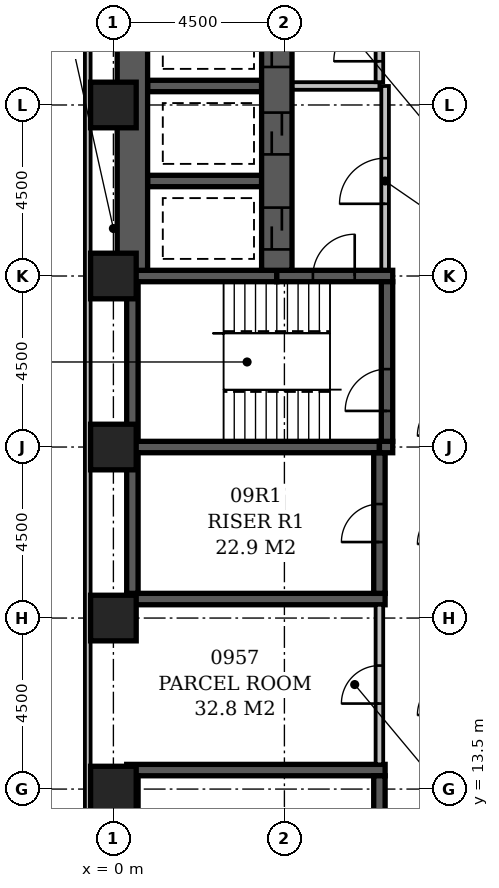
"""IFC4 building model, lengths in metres.
Left out: names, types, materials, properties, quantities, classifications, styles, units other than length and angle.
Written with IfcOpenShell. Run it as: python <this file> out.ifc"""

import sys

from ifc_helpers import new_model, si_unit, direction, frame, frame_2d, origin, origin_2d, place, context, subcontext, project, spatial, rectangle, extrude, element, fill, save


model = new_model("IFC4")
c1 = context("Model", 3, precision=1e-05, world=origin(), true_north=direction((0.0, 1.0)))
c2 = subcontext(c1, "Body", "Model", "MODEL_VIEW")
j1 = project(units=[si_unit("LENGTHUNIT", "METRE"), si_unit("PLANEANGLEUNIT", "RADIAN")], contexts=[c1])
p1 = place(None, origin())
s1 = spatial("IfcSite", under=j1, at=p1, CompositionType="ELEMENT")
p2 = place(p1, origin())
s2 = spatial("IfcBuilding", under=s1, at=p2, CompositionType="ELEMENT")
p3 = place(p2, frame((0.0, 0.0, 43.4)))
s3 = spatial("IfcBuildingStorey", under=s2, at=p3, CompositionType="ELEMENT", Elevation=43.4)
for number, where, z_axis, x_axis in (
    (1, (0.35, 14.0, -0.3), (0.0, 0.0, 1.0), (1.0, 0.0, 0.0)),
    (2, (0.35, 18.5, -0.3), (0.0, 0.0, 1.0), (1.0, 0.0, 0.0)),
):
    element("IfcWall", number, at=place(p3, frame(where, z_axis=z_axis, x_axis=x_axis)), inside=s3, PredefinedType="SHEAR", context=c2, shape_type="SweptSolid", body=[
        extrude(rectangle(XDim=6.8, YDim=0.3, at=frame_2d((3.4, 0.0))), origin(), (0.0, 0.0, 1.0), 3.6),
    ])
p4 = place(p3, frame((0.35, 22.5, -0.3), z_axis=(0.0, 0.0, 1.0), x_axis=(1.0, 0.0, 0.0)))
e3 = element("IfcWall", 3, at=p4, inside=s3, PredefinedType="SHEAR", context=c2, shape_type="SweptSolid", body=[
    extrude(rectangle(XDim=6.65, YDim=0.3, at=frame_2d((3.325, 0.0))), origin(), (0.0, 0.0, 1.0), 3.6),
])
p5 = place(p3, frame((0.35, 27.0, -0.3), z_axis=(0.0, 0.0, 1.0), x_axis=(1.0, 0.0, 0.0)))
e4 = element("IfcWall", 4, at=p5, inside=s3, PredefinedType="SHEAR", context=c2, shape_type="SweptSolid", body=[
    extrude(rectangle(XDim=3.95, YDim=0.3, at=frame_2d((1.975, 0.0))), origin(), (0.0, 0.0, 1.0), 3.6),
])
for number, where, z_axis, x_axis in (
    (5, (0.5, 10.15, -0.3), (0.0, 0.0, 1.0), (0.0, 1.0, 0.0)),
    (6, (0.5, 18.65, -0.3), (0.0, 0.0, 1.0), (0.0, 1.0, 0.0)),
):
    element("IfcWall", number, at=place(p3, frame(where, z_axis=z_axis, x_axis=x_axis)), inside=s3, PredefinedType="SHEAR", context=c2, shape_type="SweptSolid", body=[
        extrude(rectangle(XDim=3.7, YDim=0.3, at=frame_2d((1.85, 0.0))), origin(), (0.0, 0.0, 1.0), 3.6),
    ])
p6 = place(p3, frame((0.5, 22.65, -0.3), z_axis=(0.0, 0.0, 1.0), x_axis=(0.0, 1.0, 0.0)))
e7 = element("IfcWall", 7, at=p6, inside=s3, PredefinedType="SHEAR", context=c2, shape_type="SweptSolid", body=[
    extrude(rectangle(XDim=4.2, YDim=0.3, at=frame_2d((2.1, 0.0))), origin(), (0.0, 0.0, 1.0), 3.6),
])
p7 = place(p3, frame((0.5, 27.15, -0.3), z_axis=(0.0, 0.0, 1.0), x_axis=(0.0, 1.0, 0.0)))
e8 = element("IfcWall", 8, at=p7, inside=s3, PredefinedType="SHEAR", context=c2, shape_type="SweptSolid", body=[
    extrude(rectangle(XDim=6.95, YDim=0.8, at=frame_2d((3.475, 0.0))), origin(), (0.0, 0.0, 1.0), 3.6),
])
for number, where, z_axis, x_axis in (
    (9, (0.9, 29.5, -0.3), (0.0, 0.0, 1.0), (1.0, 0.0, 0.0)),
    (10, (0.9, 32.0, -0.3), (0.0, 0.0, 1.0), (1.0, 0.0, 0.0)),
):
    element("IfcWall", number, at=place(p3, frame(where, z_axis=z_axis, x_axis=x_axis)), inside=s3, PredefinedType="SHEAR", context=c2, shape_type="SweptSolid", body=[
        extrude(rectangle(XDim=3.0, YDim=0.3, at=frame_2d((1.5, 0.0))), origin(), (0.0, 0.0, 1.0), 3.6),
    ])
p8 = place(p3, frame((4.3, 27.0, -0.3), z_axis=(0.0, 0.0, 1.0), x_axis=(1.0, 0.0, 0.0)))
e11 = element("IfcWall", 11, at=p8, inside=s3, PredefinedType="SHEAR", context=c2, shape_type="SweptSolid", body=[
    extrude(rectangle(XDim=3.05, YDim=0.3, at=frame_2d((1.525, 0.0))), origin(), (0.0, 0.0, 1.0), 3.6),
])
p9 = place(p8, frame((0.95, 0.0, 0.3)))
e12 = element("IfcOpeningElement", 12, at=p9, cuts=e11, PredefinedType="OPENING", context=c2, shape_type="SweptSolid", body=[
    extrude(rectangle(XDim=1.1, YDim=2.1, at=frame_2d((0.55, 1.05))), frame((0.0, 0.162, 0.0), z_axis=(0.0, -1.0, 0.0), x_axis=(1.0, 0.0, 0.0)), (0.0, 0.0, 1.0), 0.324),
])
p10 = place(p3, frame((4.3, 27.15, -0.3), z_axis=(0.0, 0.0, 1.0), x_axis=(0.0, 1.0, 0.0)))
e13 = element("IfcWall", 13, at=p10, inside=s3, PredefinedType="SHEAR", context=c2, shape_type="SweptSolid", body=[
    extrude(rectangle(XDim=6.95, YDim=0.8, at=frame_2d((3.475, 0.0))), origin(), (0.0, 0.0, 1.0), 3.6),
])
p11 = place(p10, frame((3.05, 0.0, 0.3)))
e14 = element("IfcOpeningElement", 14, at=p11, cuts=e13, PredefinedType="OPENING", context=c2, shape_type="SweptSolid", body=[
    extrude(rectangle(XDim=1.1, YDim=2.1, at=frame_2d((0.55, 1.05))), frame((0.0, 0.412, 0.0), z_axis=(0.0, -1.0, 0.0), x_axis=(1.0, 0.0, 0.0)), (0.0, 0.0, 1.0), 0.824),
])
p12 = place(p10, frame((0.55, 0.0, 0.3)))
e15 = element("IfcOpeningElement", 15, at=p12, cuts=e13, PredefinedType="OPENING", context=c2, shape_type="SweptSolid", body=[
    extrude(rectangle(XDim=1.1, YDim=2.1, at=frame_2d((0.55, 1.05))), frame((0.0, 0.412, 0.0), z_axis=(0.0, -1.0, 0.0), x_axis=(1.0, 0.0, 0.0)), (0.0, 0.0, 1.0), 0.824),
])
p13 = place(p10, frame((5.35, 0.0, 0.3)))
e16 = element("IfcOpeningElement", 16, at=p13, cuts=e13, PredefinedType="OPENING", context=c2, shape_type="SweptSolid", body=[
    extrude(rectangle(XDim=1.1, YDim=2.1, at=frame_2d((0.55, 1.05))), frame((0.0, 0.412, 0.0), z_axis=(0.0, -1.0, 0.0), x_axis=(1.0, 0.0, 0.0)), (0.0, 0.0, 1.0), 0.824),
])
p14 = place(p3, frame((7.0, 10.15, -0.3), z_axis=(0.0, 0.0, 1.0), x_axis=(0.0, 1.0, 0.0)))
e17 = element("IfcWall", 17, at=p14, inside=s3, PredefinedType="SHEAR", context=c2, shape_type="SweptSolid", body=[
    extrude(rectangle(XDim=3.7, YDim=0.3, at=frame_2d((1.85, 0.0))), origin(), (0.0, 0.0, 1.0), 3.6),
])
p15 = place(p14, frame((1.35, 0.0, 0.3)))
e18 = element("IfcOpeningElement", 18, at=p15, cuts=e17, PredefinedType="OPENING", context=c2, shape_type="SweptSolid", body=[
    extrude(rectangle(XDim=1.0, YDim=2.1, at=frame_2d((0.5, 1.05))), frame((0.0, 0.162, 0.0), z_axis=(0.0, -1.0, 0.0), x_axis=(1.0, 0.0, 0.0)), (0.0, 0.0, 1.0), 0.324),
])
p16 = place(p3, frame((7.0, 18.65, -0.3), z_axis=(0.0, 0.0, 1.0), x_axis=(0.0, 1.0, 0.0)))
e19 = element("IfcWall", 19, at=p16, inside=s3, PredefinedType="SHEAR", context=c2, shape_type="SweptSolid", body=[
    extrude(rectangle(XDim=3.7, YDim=0.3, at=frame_2d((1.85, 0.0))), origin(), (0.0, 0.0, 1.0), 3.6),
])
p17 = place(p16, frame((1.35, 0.0, 0.3)))
e20 = element("IfcOpeningElement", 20, at=p17, cuts=e19, PredefinedType="OPENING", context=c2, shape_type="SweptSolid", body=[
    extrude(rectangle(XDim=1.0, YDim=2.1, at=frame_2d((0.5, 1.05))), frame((0.0, 0.162, 0.0), z_axis=(0.0, -1.0, 0.0), x_axis=(1.0, 0.0, 0.0)), (0.0, 0.0, 1.0), 0.324),
])
p18 = place(p3, frame((7.0, 22.5, -0.3), z_axis=(0.0, 0.0, 1.0), x_axis=(1.0, 0.0, 0.0)))
e21 = element("IfcWall", 21, at=p18, inside=s3, PredefinedType="SHEAR", context=c2, shape_type="SweptSolid", body=[
    extrude(rectangle(XDim=0.35, YDim=0.3, at=frame_2d((0.175, 0.0))), origin(), (0.0, 0.0, 1.0), 3.6),
])
p19 = place(p3, frame((7.2, 22.65, -0.3), z_axis=(0.0, 0.0, 1.0), x_axis=(0.0, 1.0, 0.0)))
e22 = element("IfcWall", 22, at=p19, inside=s3, PredefinedType="SHEAR", context=c2, shape_type="SweptSolid", body=[
    extrude(rectangle(XDim=4.2, YDim=0.3, at=frame_2d((2.1, 0.0))), origin(), (0.0, 0.0, 1.0), 3.6),
])
p20 = place(p19, frame((0.8, 0.0, 0.3)))
e23 = element("IfcOpeningElement", 23, at=p20, cuts=e22, PredefinedType="OPENING", context=c2, shape_type="SweptSolid", body=[
    extrude(rectangle(XDim=1.1, YDim=2.1, at=frame_2d((0.55, 1.05))), frame((0.0, 0.162, 0.0), z_axis=(0.0, -1.0, 0.0), x_axis=(1.0, 0.0, 0.0)), (0.0, 0.0, 1.0), 0.324),
])
for number, where, z_axis, x_axis in (
    (24, (0.0, 13.5, -0.3), (0.0, 0.0, 1.0), (1.0, 0.0, 0.0)),
    (25, (0.0, 18.0, -0.3), (0.0, 0.0, 1.0), (1.0, 0.0, 0.0)),
    (26, (0.0, 22.5, -0.3), (0.0, 0.0, 1.0), (1.0, 0.0, 0.0)),
    (27, (0.0, 27.0, -0.3), (0.0, 0.0, 1.0), (1.0, 0.0, 0.0)),
    (28, (0.0, 31.5, -0.3), (0.0, 0.0, 1.0), (1.0, 0.0, 0.0)),
):
    element("IfcColumn", number, at=place(p3, frame(where, z_axis=z_axis, x_axis=x_axis)), inside=s3, PredefinedType="COLUMN", context=c2, shape_type="SweptSolid", body=[
        extrude(rectangle(XDim=1.2, YDim=1.2, at=origin_2d()), origin(), (0.0, 0.0, 1.0), 3.6),
    ])
p21 = place(p3, frame((-0.675, 59.1, 0.0), z_axis=(0.0, 0.0, 1.0), x_axis=(0.0, -1.0, 0.0)))
e29 = element("IfcWall", 29, at=p21, inside=s3, PredefinedType="STANDARD", context=c2, shape_type="SweptSolid", body=[
    extrude(rectangle(XDim=55.35, YDim=0.15, at=frame_2d((27.675, 0.0))), origin(), (0.0, 0.0, 1.0), 2.7),
])
p22 = place(p21, frame((10.65, 0.0, 0.6)))
e30 = element("IfcOpeningElement", 30, at=p22, cuts=e29, PredefinedType="OPENING", context=c2, shape_type="SweptSolid", body=[
    extrude(rectangle(XDim=2.4, YDim=1.8, at=frame_2d((1.2, 0.9))), frame((0.0, 0.087, 0.0), z_axis=(0.0, -1.0, 0.0), x_axis=(1.0, 0.0, 0.0)), (0.0, 0.0, 1.0), 0.174),
])
p23 = place(p21, frame((15.15, 0.0, 0.6)))
e31 = element("IfcOpeningElement", 31, at=p23, cuts=e29, PredefinedType="OPENING", context=c2, shape_type="SweptSolid", body=[
    extrude(rectangle(XDim=2.4, YDim=1.8, at=frame_2d((1.2, 0.9))), frame((0.0, 0.087, 0.0), z_axis=(0.0, -1.0, 0.0), x_axis=(1.0, 0.0, 0.0)), (0.0, 0.0, 1.0), 0.174),
])
p24 = place(p21, frame((19.65, 0.0, 0.6)))
e32 = element("IfcOpeningElement", 32, at=p24, cuts=e29, PredefinedType="OPENING", context=c2, shape_type="SweptSolid", body=[
    extrude(rectangle(XDim=2.4, YDim=1.8, at=frame_2d((1.2, 0.9))), frame((0.0, 0.087, 0.0), z_axis=(0.0, -1.0, 0.0), x_axis=(1.0, 0.0, 0.0)), (0.0, 0.0, 1.0), 0.174),
])
p25 = place(p3, frame((4.72, 32.0, 0.0), z_axis=(0.0, 0.0, 1.0), x_axis=(1.0, 0.0, 0.0)))
e33 = element("IfcWall", 33, at=p25, inside=s3, PredefinedType="PARTITIONING", context=c2, shape_type="SweptSolid", body=[
    extrude(rectangle(XDim=2.28, YDim=0.2, at=frame_2d((1.14, 0.0))), origin(), (0.0, 0.0, 1.0), 3.3),
])
p26 = place(p3, frame((7.0, 32.1, 0.0), z_axis=(0.0, 0.0, 1.0), x_axis=(0.0, 1.0, 0.0)))
e34 = element("IfcWall", 34, at=p26, inside=s3, PredefinedType="PARTITIONING", context=c2, shape_type="SweptSolid", body=[
    extrude(rectangle(XDim=2.4, YDim=0.2, at=frame_2d((1.2, 0.0))), origin(), (0.0, 0.0, 1.0), 3.3),
])
p27 = place(p26, frame((0.55, 0.0, 0.0)))
e35 = element("IfcOpeningElement", 35, at=p27, cuts=e34, PredefinedType="OPENING", context=c2, shape_type="SweptSolid", body=[
    extrude(rectangle(XDim=1.2, YDim=2.1, at=frame_2d((0.6, 1.05))), frame((0.0, 0.112, 0.0), z_axis=(0.0, -1.0, 0.0), x_axis=(1.0, 0.0, 0.0)), (0.0, 0.0, 1.0), 0.224),
])
p28 = place(p3, frame((7.15, 27.17, 0.0), z_axis=(0.0, 0.0, 1.0), x_axis=(0.0, 1.0, 0.0)))
e36 = element("IfcWall", 36, at=p28, inside=s3, PredefinedType="PARTITIONING", context=c2, shape_type="SweptSolid", body=[
    extrude(rectangle(XDim=4.83, YDim=0.2, at=frame_2d((2.415, 0.0))), origin(), (0.0, 0.0, 1.0), 3.3),
])
p29 = place(p28, frame((1.73, 0.0, 0.0)))
e37 = element("IfcOpeningElement", 37, at=p29, cuts=e36, PredefinedType="OPENING", context=c2, shape_type="SweptSolid", body=[
    extrude(rectangle(XDim=1.2, YDim=2.1, at=frame_2d((0.6, 1.05))), frame((0.0, 0.112, 0.0), z_axis=(0.0, -1.0, 0.0), x_axis=(1.0, 0.0, 0.0)), (0.0, 0.0, 1.0), 0.224),
])
p30 = place(p3, frame((7.0, 14.15, 0.0), z_axis=(0.0, 0.0, 1.0), x_axis=(0.0, 1.0, 0.0)))
e38 = element("IfcWall", 38, at=p30, inside=s3, PredefinedType="PARTITIONING", context=c2, shape_type="SweptSolid", body=[
    extrude(rectangle(XDim=4.2, YDim=0.2, at=frame_2d((2.1, 0.0))), origin(), (0.0, 0.0, 1.0), 3.3),
])
p31 = place(p30, frame((1.6, 0.0, 0.0)))
e39 = element("IfcOpeningElement", 39, at=p31, cuts=e38, PredefinedType="OPENING", context=c2, shape_type="SweptSolid", body=[
    extrude(rectangle(XDim=1.0, YDim=2.1, at=frame_2d((0.5, 1.05))), frame((0.0, 0.112, 0.0), z_axis=(0.0, -1.0, 0.0), x_axis=(1.0, 0.0, 0.0)), (0.0, 0.0, 1.0), 0.224),
])
p32 = place(p29, origin())
e40 = element("IfcDoor", 40, at=p32, inside=s3, OperationType="SINGLE_SWING_LEFT", PredefinedType="DOOR", context=c2, shape_type="SweptSolid", body=[
    extrude(rectangle(XDim=1.2, YDim=2.1, at=frame_2d((0.6, 1.05))), frame((0.0, 0.025, 0.0), z_axis=(0.0, -1.0, 0.0), x_axis=(1.0, 0.0, 0.0)), (0.0, 0.0, 1.0), 0.05),
])
fill(e37, e40)
p33 = place(p11, origin())
e41 = element("IfcDoor", 41, at=p33, inside=s3, OperationType="SLIDING_TO_LEFT", PredefinedType="DOOR", context=c2, shape_type="SweptSolid", body=[
    extrude(rectangle(XDim=1.1, YDim=2.1, at=frame_2d((0.55, 1.05))), frame((0.0, 0.025, 0.0), z_axis=(0.0, -1.0, 0.0), x_axis=(1.0, 0.0, 0.0)), (0.0, 0.0, 1.0), 0.05),
])
fill(e14, e41)
p34 = place(p12, origin())
e42 = element("IfcDoor", 42, at=p34, inside=s3, OperationType="SLIDING_TO_LEFT", PredefinedType="DOOR", context=c2, shape_type="SweptSolid", body=[
    extrude(rectangle(XDim=1.1, YDim=2.1, at=frame_2d((0.55, 1.05))), frame((0.0, 0.025, 0.0), z_axis=(0.0, -1.0, 0.0), x_axis=(1.0, 0.0, 0.0)), (0.0, 0.0, 1.0), 0.05),
])
fill(e15, e42)
p35 = place(p27, origin())
e43 = element("IfcDoor", 43, at=p35, inside=s3, OperationType="SINGLE_SWING_LEFT", PredefinedType="DOOR", context=c2, shape_type="SweptSolid", body=[
    extrude(rectangle(XDim=1.2, YDim=2.1, at=frame_2d((0.6, 1.05))), frame((0.0, 0.025, 0.0), z_axis=(0.0, -1.0, 0.0), x_axis=(1.0, 0.0, 0.0)), (0.0, 0.0, 1.0), 0.05),
])
fill(e35, e43)
p36 = place(p13, origin())
e44 = element("IfcDoor", 44, at=p36, inside=s3, OperationType="SLIDING_TO_LEFT", PredefinedType="DOOR", context=c2, shape_type="SweptSolid", body=[
    extrude(rectangle(XDim=1.1, YDim=2.1, at=frame_2d((0.55, 1.05))), frame((0.0, 0.025, 0.0), z_axis=(0.0, -1.0, 0.0), x_axis=(1.0, 0.0, 0.0)), (0.0, 0.0, 1.0), 0.05),
])
fill(e16, e44)
p37 = place(p17, origin())
e45 = element("IfcDoor", 45, at=p37, inside=s3, OperationType="SINGLE_SWING_LEFT", PredefinedType="DOOR", context=c2, shape_type="SweptSolid", body=[
    extrude(rectangle(XDim=1.0, YDim=2.1, at=frame_2d((0.5, 1.05))), frame((0.0, 0.025, 0.0), z_axis=(0.0, -1.0, 0.0), x_axis=(1.0, 0.0, 0.0)), (0.0, 0.0, 1.0), 0.05),
])
fill(e20, e45)
p38 = place(p9, frame((1.1, 0.0, 0.0), z_axis=(0.0, 0.0, 1.0), x_axis=(-1.0, 0.0, 0.0)))
e46 = element("IfcDoor", 46, at=p38, inside=s3, OperationType="SINGLE_SWING_LEFT", PredefinedType="DOOR", context=c2, shape_type="SweptSolid", body=[
    extrude(rectangle(XDim=1.1, YDim=2.1, at=frame_2d((0.55, 1.05))), frame((0.0, 0.025, 0.0), z_axis=(0.0, -1.0, 0.0), x_axis=(1.0, 0.0, 0.0)), (0.0, 0.0, 1.0), 0.05),
])
fill(e12, e46)
p39 = place(p20, origin())
e47 = element("IfcDoor", 47, at=p39, inside=s3, OperationType="SINGLE_SWING_LEFT", PredefinedType="DOOR", context=c2, shape_type="SweptSolid", body=[
    extrude(rectangle(XDim=1.1, YDim=2.1, at=frame_2d((0.55, 1.05))), frame((0.0, 0.025, 0.0), z_axis=(0.0, -1.0, 0.0), x_axis=(1.0, 0.0, 0.0)), (0.0, 0.0, 1.0), 0.05),
])
fill(e23, e47)
p40 = place(p31, origin())
e48 = element("IfcDoor", 48, at=p40, inside=s3, OperationType="SINGLE_SWING_LEFT", PredefinedType="DOOR", context=c2, shape_type="SweptSolid", body=[
    extrude(rectangle(XDim=1.0, YDim=2.1, at=frame_2d((0.5, 1.05))), frame((0.0, 0.025, 0.0), z_axis=(0.0, -1.0, 0.0), x_axis=(1.0, 0.0, 0.0)), (0.0, 0.0, 1.0), 0.05),
])
fill(e39, e48)
save(model, sys.argv[1])
